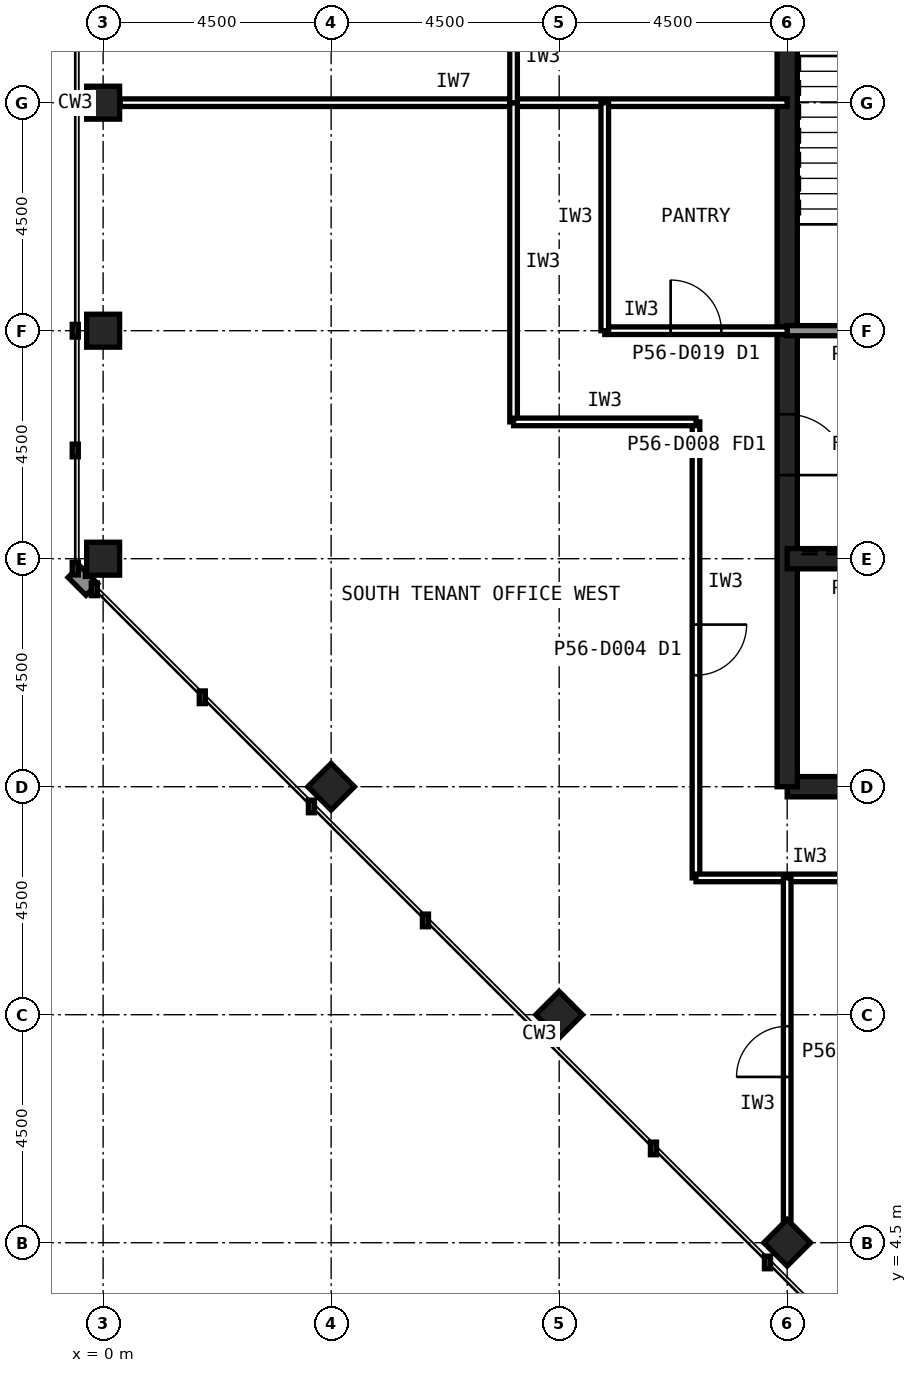
"""IFC4 building model, lengths in metres.
Left out: names, types, materials, properties, quantities, classifications, styles, units other than length and angle.
Written with IfcOpenShell. Run it as: python <this file> out.ifc"""

import sys

from ifc_helpers import new_model, si_unit, direction, frame, frame_2d, origin, origin_2d, place, context, subcontext, project, spatial, rectangle, hollow_rectangle, extrude, element, fill, save


model = new_model("IFC4")
c1 = context("Model", 3, precision=1e-05, world=origin(), true_north=direction((0.0, 1.0)))
c2 = subcontext(c1, "Body", "Model", "MODEL_VIEW")
j1 = project(units=[si_unit("LENGTHUNIT", "METRE"), si_unit("PLANEANGLEUNIT", "RADIAN")], contexts=[c1])
p1 = place(None, origin())
s1 = spatial("IfcSite", under=j1, at=p1, CompositionType="ELEMENT")
p2 = place(p1, origin())
s2 = spatial("IfcBuilding", under=s1, at=p2, CompositionType="ELEMENT")
p3 = place(p2, frame((0.0, 0.0, 238.6)))
s3 = spatial("IfcBuildingStorey", under=s2, at=p3, CompositionType="ELEMENT", Elevation=238.6)
for number, where, z_axis, x_axis in (
    (1, (0.0, 27.0, 0.0), (0.0, 0.0, 1.0), (1.0, 0.0, 0.0)),
    (2, (0.0, 22.5, 0.0), (0.0, 0.0, 1.0), (1.0, 0.0, 0.0)),
    (3, (0.0, 18.0, 0.0), (0.0, 0.0, 1.0), (1.0, 0.0, 0.0)),
    (4, (13.5, 4.5, 0.0), (0.0, 0.0, 1.0), (0.707, 0.707, 0.0)),
    (5, (9.0, 9.0, 0.0), (0.0, 0.0, 1.0), (0.707, 0.707, 0.0)),
    (6, (4.5, 13.5, 0.0), (0.0, 0.0, 1.0), (0.707, 0.707, 0.0)),
):
    element("IfcColumn", number, at=place(p3, frame(where, z_axis=z_axis, x_axis=x_axis)), inside=s3, PredefinedType="COLUMN", context=c2, shape_type="SweptSolid", body=[
        extrude(hollow_rectangle(XDim=0.65, YDim=0.65, WallThickness=0.032, at=origin_2d()), origin(), (0.0, 0.0, 1.0), 4.0),
    ])
p4 = place(p3, frame((13.5, 13.5, 0.0), z_axis=(0.0, 0.0, 1.0), x_axis=(1.0, 0.0, 0.0)))
e7 = element("IfcWall", 7, at=p4, inside=s3, PredefinedType="SHEAR", context=c2, shape_type="SweptSolid", body=[
    extrude(rectangle(XDim=27.0, YDim=0.4, at=frame_2d((13.5, 0.0))), origin(), (0.0, 0.0, 1.0), 4.0),
])
p5 = place(p3, frame((13.5, 40.5, 0.0), z_axis=(0.0, 0.0, 1.0), x_axis=(0.0, -1.0, 0.0)))
e8 = element("IfcWall", 8, at=p5, inside=s3, PredefinedType="SHEAR", context=c2, shape_type="SweptSolid", body=[
    extrude(rectangle(XDim=27.0, YDim=0.4, at=frame_2d((13.5, 0.0))), origin(), (0.0, 0.0, 1.0), 4.0),
])
p6 = place(p5, frame((19.65, 0.0, 0.0)))
e9 = element("IfcOpeningElement", 9, at=p6, cuts=e8, PredefinedType="OPENING", context=c2, shape_type="SweptSolid", body=[
    extrude(rectangle(XDim=1.2, YDim=2.1, at=frame_2d((0.6, 1.05))), frame((0.0, 0.21, 0.0), z_axis=(0.0, -1.0, 0.0), x_axis=(1.0, 0.0, 0.0)), (0.0, 0.0, 1.0), 0.42),
])
p7 = place(p5, frame((5.85, 0.0, 0.0)))
e10 = element("IfcOpeningElement", 10, at=p7, cuts=e8, PredefinedType="OPENING", context=c2, shape_type="SweptSolid", body=[
    extrude(rectangle(XDim=1.8, YDim=2.1, at=frame_2d((0.9, 1.05))), frame((0.0, 0.21, 0.0), z_axis=(0.0, -1.0, 0.0), x_axis=(1.0, 0.0, 0.0)), (0.0, 0.0, 1.0), 0.42),
])
p8 = place(p3, frame((13.5, 18.0, 0.0), z_axis=(0.0, 0.0, 1.0), x_axis=(1.0, 0.0, 0.0)))
e11 = element("IfcWall", 11, at=p8, inside=s3, PredefinedType="SHEAR", context=c2, shape_type="SweptSolid", body=[
    extrude(rectangle(XDim=27.0, YDim=0.4, at=frame_2d((13.5, 0.0))), origin(), (0.0, 0.0, 1.0), 4.0),
])
p9 = place(p8, frame((24.3, 0.0, 0.0)))
e12 = element("IfcOpeningElement", 12, at=p9, cuts=e11, PredefinedType="OPENING", context=c2, shape_type="SweptSolid", body=[
    extrude(rectangle(XDim=0.9, YDim=2.1, at=frame_2d((0.45, 1.05))), frame((0.0, 0.21, 0.0), z_axis=(0.0, -1.0, 0.0), x_axis=(1.0, 0.0, 0.0)), (0.0, 0.0, 1.0), 0.42),
])
p10 = place(p8, frame((5.45, 0.0, 0.0)))
e13 = element("IfcOpeningElement", 13, at=p10, cuts=e11, PredefinedType="OPENING", context=c2, shape_type="SweptSolid", body=[
    extrude(rectangle(XDim=1.1, YDim=2.1, at=frame_2d((0.55, 1.05))), frame((0.0, 0.21, 0.0), z_axis=(0.0, -1.0, 0.0), x_axis=(1.0, 0.0, 0.0)), (0.0, 0.0, 1.0), 0.42),
])
p11 = place(p8, frame((8.45, 0.0, 0.0)))
e14 = element("IfcOpeningElement", 14, at=p11, cuts=e11, PredefinedType="OPENING", context=c2, shape_type="SweptSolid", body=[
    extrude(rectangle(XDim=1.1, YDim=2.1, at=frame_2d((0.55, 1.05))), frame((0.0, 0.21, 0.0), z_axis=(0.0, -1.0, 0.0), x_axis=(1.0, 0.0, 0.0)), (0.0, 0.0, 1.0), 0.42),
])
p12 = place(p8, frame((11.45, 0.0, 0.0)))
e15 = element("IfcOpeningElement", 15, at=p12, cuts=e11, PredefinedType="OPENING", context=c2, shape_type="SweptSolid", body=[
    extrude(rectangle(XDim=1.1, YDim=2.1, at=frame_2d((0.55, 1.05))), frame((0.0, 0.21, 0.0), z_axis=(0.0, -1.0, 0.0), x_axis=(1.0, 0.0, 0.0)), (0.0, 0.0, 1.0), 0.42),
])
p13 = place(p8, frame((14.45, 0.0, 0.0)))
e16 = element("IfcOpeningElement", 16, at=p13, cuts=e11, PredefinedType="OPENING", context=c2, shape_type="SweptSolid", body=[
    extrude(rectangle(XDim=1.1, YDim=2.1, at=frame_2d((0.55, 1.05))), frame((0.0, 0.21, 0.0), z_axis=(0.0, -1.0, 0.0), x_axis=(1.0, 0.0, 0.0)), (0.0, 0.0, 1.0), 0.42),
])
p14 = place(p8, frame((17.45, 0.0, 0.0)))
e17 = element("IfcOpeningElement", 17, at=p14, cuts=e11, PredefinedType="OPENING", context=c2, shape_type="SweptSolid", body=[
    extrude(rectangle(XDim=1.1, YDim=2.1, at=frame_2d((0.55, 1.05))), frame((0.0, 0.21, 0.0), z_axis=(0.0, -1.0, 0.0), x_axis=(1.0, 0.0, 0.0)), (0.0, 0.0, 1.0), 0.42),
])
p15 = place(p8, frame((20.45, 0.0, 0.0)))
e18 = element("IfcOpeningElement", 18, at=p15, cuts=e11, PredefinedType="OPENING", context=c2, shape_type="SweptSolid", body=[
    extrude(rectangle(XDim=1.1, YDim=2.1, at=frame_2d((0.55, 1.05))), frame((0.0, 0.21, 0.0), z_axis=(0.0, -1.0, 0.0), x_axis=(1.0, 0.0, 0.0)), (0.0, 0.0, 1.0), 0.42),
])
p16 = place(p8, frame((1.6, 0.0, 0.0)))
e19 = element("IfcOpeningElement", 19, at=p16, cuts=e11, PredefinedType="OPENING", context=c2, shape_type="SweptSolid", body=[
    extrude(rectangle(XDim=1.3, YDim=2.2, at=frame_2d((0.65, 1.1))), frame((0.0, 0.21, 0.0), z_axis=(0.0, -1.0, 0.0), x_axis=(1.0, 0.0, 0.0)), (0.0, 0.0, 1.0), 0.42),
])
p17 = place(p3, frame((13.5, 22.5, 0.0), z_axis=(0.0, 0.0, 1.0), x_axis=(1.0, 0.0, 0.0)))
e20 = element("IfcWall", 20, at=p17, inside=s3, PredefinedType="SOLIDWALL", context=c2, shape_type="SweptSolid", body=[
    extrude(rectangle(XDim=27.0, YDim=0.2, at=frame_2d((13.5, 0.0))), origin(), (0.0, 0.0, 1.0), 3.84),
])
p18 = place(p17, frame((1.65, 0.0, 0.0)))
e21 = element("IfcOpeningElement", 21, at=p18, cuts=e20, PredefinedType="OPENING", context=c2, shape_type="SweptSolid", body=[
    extrude(rectangle(XDim=1.2, YDim=2.1, at=frame_2d((0.6, 1.05))), frame((0.0, 0.11, 0.0), z_axis=(0.0, -1.0, 0.0), x_axis=(1.0, 0.0, 0.0)), (0.0, 0.0, 1.0), 0.22),
])
p19 = place(p17, frame((6.025, 0.0, 0.0)))
e22 = element("IfcOpeningElement", 22, at=p19, cuts=e20, PredefinedType="OPENING", context=c2, shape_type="SweptSolid", body=[
    extrude(rectangle(XDim=1.0, YDim=2.1, at=frame_2d((0.5, 1.05))), frame((0.0, 0.11, 0.0), z_axis=(0.0, -1.0, 0.0), x_axis=(1.0, 0.0, 0.0)), (0.0, 0.0, 1.0), 0.22),
])
p20 = place(p17, frame((10.525, 0.0, 0.0)))
e23 = element("IfcOpeningElement", 23, at=p20, cuts=e20, PredefinedType="OPENING", context=c2, shape_type="SweptSolid", body=[
    extrude(rectangle(XDim=1.0, YDim=2.1, at=frame_2d((0.5, 1.05))), frame((0.0, 0.11, 0.0), z_axis=(0.0, -1.0, 0.0), x_axis=(1.0, 0.0, 0.0)), (0.0, 0.0, 1.0), 0.22),
])
p21 = place(p17, frame((19.75, 0.0, 0.0)))
e24 = element("IfcOpeningElement", 24, at=p21, cuts=e20, PredefinedType="OPENING", context=c2, shape_type="SweptSolid", body=[
    extrude(rectangle(XDim=1.0, YDim=2.1, at=frame_2d((0.5, 1.05))), frame((0.0, 0.11, 0.0), z_axis=(0.0, -1.0, 0.0), x_axis=(1.0, 0.0, 0.0)), (0.0, 0.0, 1.0), 0.22),
])
p22 = place(p17, frame((15.05, 0.0, 0.0)))
e25 = element("IfcOpeningElement", 25, at=p22, cuts=e20, PredefinedType="OPENING", context=c2, shape_type="SweptSolid", body=[
    extrude(rectangle(XDim=1.4, YDim=2.4, at=frame_2d((0.7, 1.2))), frame((0.0, 0.11, 0.0), z_axis=(0.0, -1.0, 0.0), x_axis=(1.0, 0.0, 0.0)), (0.0, 0.0, 1.0), 0.22),
])
p23 = place(p3, frame((0.335, 27.0, 0.0), z_axis=(0.0, 0.0, 1.0), x_axis=(1.0, 0.0, 0.0)))
e26 = element("IfcWall", 26, at=p23, inside=s3, PredefinedType="PARTITIONING", context=c2, shape_type="SweptSolid", body=[
    extrude(rectangle(XDim=13.165, YDim=0.15, at=frame_2d((6.583, 0.0))), origin(), (0.0, 0.0, 1.0), 2.989),
])
p24 = place(p3, frame((11.7, 20.7, 0.0), z_axis=(0.0, 0.0, 1.0), x_axis=(0.0, -1.0, 0.0)))
e27 = element("IfcWall", 27, at=p24, inside=s3, PredefinedType="PARTITIONING", context=c2, shape_type="SweptSolid", body=[
    extrude(rectangle(XDim=9.0, YDim=0.15, at=frame_2d((4.5, 0.0))), origin(), (0.0, 0.0, 1.0), 3.84),
])
p25 = place(p24, frame((4.0, 0.0, 0.0)))
e28 = element("IfcOpeningElement", 28, at=p25, cuts=e27, PredefinedType="OPENING", context=c2, shape_type="SweptSolid", body=[
    extrude(rectangle(XDim=1.0, YDim=2.1, at=frame_2d((0.5, 1.05))), frame((0.0, 0.085, 0.0), z_axis=(0.0, -1.0, 0.0), x_axis=(1.0, 0.0, 0.0)), (0.0, 0.0, 1.0), 0.17),
])
p26 = place(p3, frame((8.1, 27.0, 0.0), z_axis=(0.0, 0.0, 1.0), x_axis=(0.0, -1.0, 0.0)))
e29 = element("IfcWall", 29, at=p26, inside=s3, PredefinedType="PARTITIONING", context=c2, shape_type="SweptSolid", body=[
    extrude(rectangle(XDim=6.3, YDim=0.15, at=frame_2d((3.15, 0.0))), origin(), (0.0, 0.0, 1.0), 3.84),
])
p27 = place(p3, frame((11.7, 11.7, 0.0), z_axis=(0.0, 0.0, 1.0), x_axis=(1.0, 0.0, 0.0)))
e30 = element("IfcWall", 30, at=p27, inside=s3, PredefinedType="PARTITIONING", context=c2, shape_type="SweptSolid", body=[
    extrude(rectangle(XDim=4.5, YDim=0.15, at=frame_2d((2.25, 0.0))), origin(), (0.0, 0.0, 1.0), 3.84),
])
p28 = place(p3, frame((8.1, 20.7, 0.0), z_axis=(0.0, 0.0, 1.0), x_axis=(1.0, 0.0, 0.0)))
e31 = element("IfcWall", 31, at=p28, inside=s3, PredefinedType="PARTITIONING", context=c2, shape_type="SweptSolid", body=[
    extrude(rectangle(XDim=3.6, YDim=0.15, at=frame_2d((1.8, 0.0))), origin(), (0.0, 0.0, 1.0), 3.84),
])
p29 = place(p3, frame((8.1, 28.8, 0.0), z_axis=(0.0, 0.0, 1.0), x_axis=(0.0, -1.0, 0.0)))
e32 = element("IfcWall", 32, at=p29, inside=s3, PredefinedType="PARTITIONING", context=c2, shape_type="SweptSolid", body=[
    extrude(rectangle(XDim=1.8, YDim=0.15, at=frame_2d((0.9, 0.0))), origin(), (0.0, 0.0, 1.0), 3.84),
])
p30 = place(p3, frame((9.9, 22.5, 0.0), z_axis=(0.0, 0.0, 1.0), x_axis=(1.0, 0.0, 0.0)))
e33 = element("IfcWall", 33, at=p30, inside=s3, PredefinedType="PARTITIONING", context=c2, shape_type="SweptSolid", body=[
    extrude(rectangle(XDim=3.6, YDim=0.15, at=frame_2d((1.8, 0.0))), origin(), (0.0, 0.0, 1.0), 2.989),
])
p31 = place(p30, frame((1.3, 0.0, 0.0)))
e34 = element("IfcOpeningElement", 34, at=p31, cuts=e33, PredefinedType="OPENING", context=c2, shape_type="SweptSolid", body=[
    extrude(rectangle(XDim=1.0, YDim=2.1, at=frame_2d((0.5, 1.05))), frame((0.0, 0.085, 0.0), z_axis=(0.0, -1.0, 0.0), x_axis=(1.0, 0.0, 0.0)), (0.0, 0.0, 1.0), 0.17),
])
p32 = place(p3, frame((9.9, 27.0, 0.0), z_axis=(0.0, 0.0, 1.0), x_axis=(0.0, -1.0, 0.0)))
e35 = element("IfcWall", 35, at=p32, inside=s3, PredefinedType="PARTITIONING", context=c2, shape_type="SweptSolid", body=[
    extrude(rectangle(XDim=4.5, YDim=0.15, at=frame_2d((2.25, 0.0))), origin(), (0.0, 0.0, 1.0), 3.84),
])
p33 = place(p3, frame((13.5, 4.845, 0.0), z_axis=(0.0, 0.0, 1.0), x_axis=(0.0, 1.0, 0.0)))
e36 = element("IfcWall", 36, at=p33, inside=s3, PredefinedType="PARTITIONING", context=c2, shape_type="SweptSolid", body=[
    extrude(rectangle(XDim=6.855, YDim=0.15, at=frame_2d((3.427, 0.0))), origin(), (0.0, 0.0, 1.0), 2.989),
])
p34 = place(p33, frame((2.927, 0.0, 0.0)))
e37 = element("IfcOpeningElement", 37, at=p34, cuts=e36, PredefinedType="OPENING", context=c2, shape_type="SweptSolid", body=[
    extrude(rectangle(XDim=1.0, YDim=2.1, at=frame_2d((0.5, 1.05))), frame((0.0, 0.085, 0.0), z_axis=(0.0, -1.0, 0.0), x_axis=(1.0, 0.0, 0.0)), (0.0, 0.0, 1.0), 0.17),
])
p35 = place(p6, origin())
e38 = element("IfcDoor", 38, at=p35, inside=s3, OperationType="SINGLE_SWING_RIGHT", PredefinedType="DOOR", context=c2, shape_type="SweptSolid", body=[
    extrude(rectangle(XDim=1.2, YDim=2.1, at=frame_2d((0.6, 1.05))), frame((0.0, 0.025, 0.0), z_axis=(0.0, -1.0, 0.0), x_axis=(1.0, 0.0, 0.0)), (0.0, 0.0, 1.0), 0.05),
])
fill(e9, e38)
p36 = place(p25, origin())
e39 = element("IfcDoor", 39, at=p36, inside=s3, OperationType="SINGLE_SWING_LEFT", PredefinedType="DOOR", context=c2, shape_type="SweptSolid", body=[
    extrude(rectangle(XDim=1.0, YDim=2.1, at=frame_2d((0.5, 1.05))), frame((0.0, 0.025, 0.0), z_axis=(0.0, -1.0, 0.0), x_axis=(1.0, 0.0, 0.0)), (0.0, 0.0, 1.0), 0.05),
])
fill(e28, e39)
p37 = place(p31, origin())
e40 = element("IfcDoor", 40, at=p37, inside=s3, OperationType="SINGLE_SWING_LEFT", PredefinedType="DOOR", context=c2, shape_type="SweptSolid", body=[
    extrude(rectangle(XDim=1.0, YDim=2.1, at=frame_2d((0.5, 1.05))), frame((0.0, 0.025, 0.0), z_axis=(0.0, -1.0, 0.0), x_axis=(1.0, 0.0, 0.0)), (0.0, 0.0, 1.0), 0.05),
])
fill(e34, e40)
p38 = place(p34, origin())
e41 = element("IfcDoor", 41, at=p38, inside=s3, OperationType="SINGLE_SWING_LEFT", PredefinedType="DOOR", context=c2, shape_type="SweptSolid", body=[
    extrude(rectangle(XDim=1.0, YDim=2.1, at=frame_2d((0.5, 1.05))), frame((0.0, 0.025, 0.0), z_axis=(0.0, -1.0, 0.0), x_axis=(1.0, 0.0, 0.0)), (0.0, 0.0, 1.0), 0.05),
])
fill(e37, e41)
save(model, sys.argv[1])
